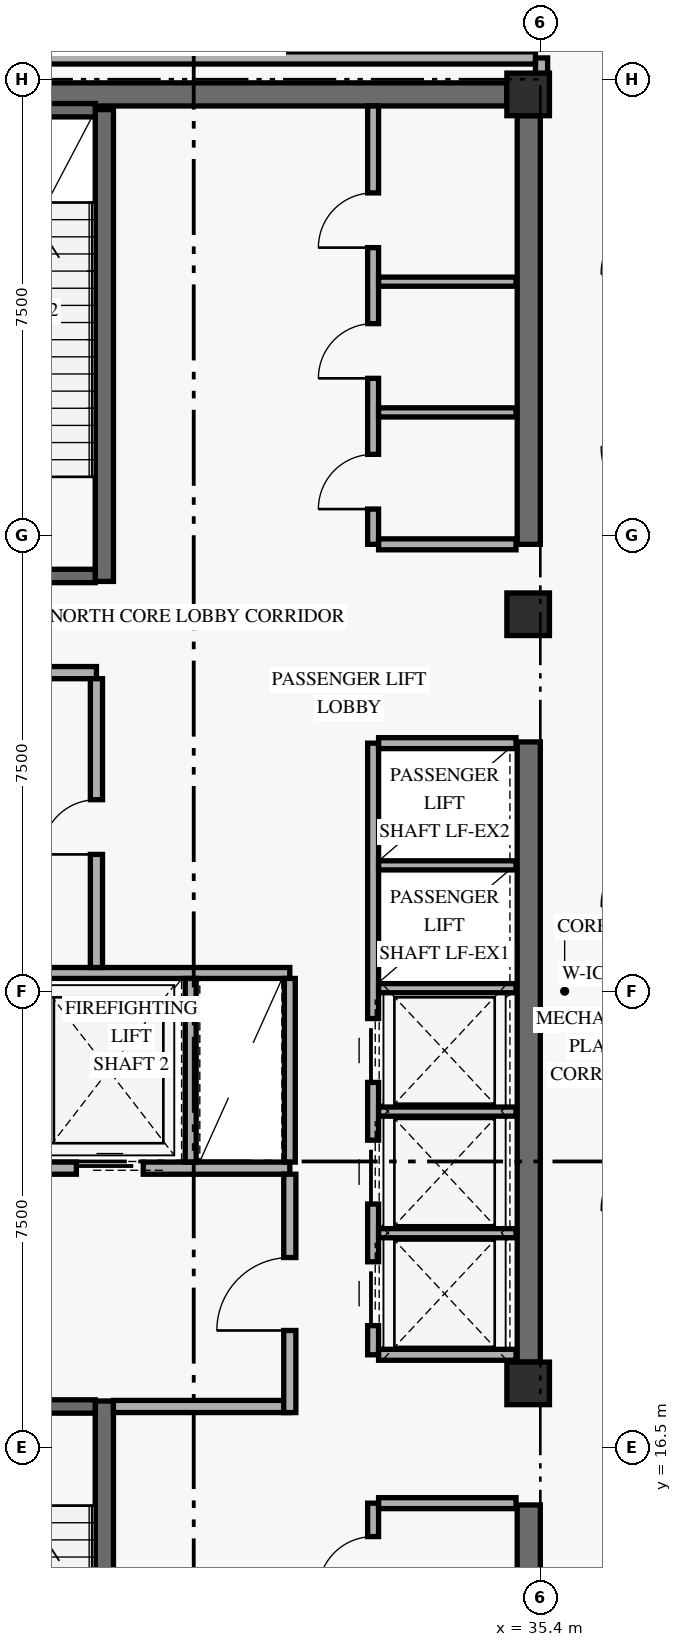
"""IFC4 building model, lengths in metres.
Left out: names, types, materials, properties, quantities, classifications, styles, units other than length and angle.
Written with IfcOpenShell. Run it as: python <this file> out.ifc"""

import sys

from ifc_helpers import new_model, si_unit, direction, frame, frame_2d, origin, origin_2d, place, context, subcontext, project, spatial, rectangle, extrude, element, fill, save


model = new_model("IFC4")
c1 = context("Model", 3, precision=1e-05, world=origin(), true_north=direction((0.0, 1.0)))
c2 = subcontext(c1, "Body", "Model", "MODEL_VIEW")
j1 = project(units=[si_unit("LENGTHUNIT", "METRE"), si_unit("PLANEANGLEUNIT", "RADIAN")], contexts=[c1])
p1 = place(None, origin())
s1 = spatial("IfcSite", under=j1, at=p1, CompositionType="ELEMENT")
p2 = place(p1, origin())
s2 = spatial("IfcBuilding", under=s1, at=p2, CompositionType="ELEMENT")
p3 = place(p2, frame((0.0, 0.0, 199.8)))
s3 = spatial("IfcBuildingStorey", under=s2, at=p3, CompositionType="ELEMENT", Elevation=199.8)
p4 = place(p3, frame((35.21, 9.6, 0.0), z_axis=(0.0, 0.0, 1.0), x_axis=(0.0, 1.0, 0.0)))
e1 = element("IfcWall", 1, at=p4, inside=s3, PredefinedType="SHEAR", context=c2, shape_type="SweptSolid", body=[
    extrude(rectangle(XDim=5.95, YDim=0.38, at=frame_2d((2.975, 0.0))), origin(), (0.0, 0.0, 1.0), 5.148),
])
p5 = place(p3, frame((35.21, 17.9, 0.0), z_axis=(0.0, 0.0, 1.0), x_axis=(0.0, 1.0, 0.0)))
e2 = element("IfcWall", 2, at=p5, inside=s3, PredefinedType="SHEAR", context=c2, shape_type="SweptSolid", body=[
    extrude(rectangle(XDim=10.2, YDim=0.38, at=frame_2d((5.1, 0.0))), origin(), (0.0, 0.0, 1.0), 5.148),
])
p6 = place(p3, frame((35.21, 31.35, 0.0), z_axis=(0.0, 0.0, 1.0), x_axis=(0.0, 1.0, 0.0)))
e3 = element("IfcWall", 3, at=p6, inside=s3, PredefinedType="SHEAR", context=c2, shape_type="SweptSolid", body=[
    extrude(rectangle(XDim=7.05, YDim=0.38, at=frame_2d((3.525, 0.0))), origin(), (0.0, 0.0, 1.0), 5.148),
])
p7 = place(p3, frame((24.55, 38.75, 0.0), z_axis=(0.0, 0.0, 1.0), x_axis=(1.0, 0.0, 0.0)))
e4 = element("IfcWall", 4, at=p7, inside=s3, PredefinedType="SHEAR", context=c2, shape_type="SweptSolid", body=[
    extrude(rectangle(XDim=10.3, YDim=0.38, at=frame_2d((5.15, 0.0))), origin(), (0.0, 0.0, 1.0), 5.76),
])
p8 = place(p3, frame((28.23, 9.5, 0.0), z_axis=(0.0, 0.0, 1.0), x_axis=(0.0, 1.0, 0.0)))
e5 = element("IfcWall", 5, at=p8, inside=s3, PredefinedType="SHEAR", context=c2, shape_type="SweptSolid", body=[
    extrude(rectangle(XDim=7.76, YDim=0.3, at=frame_2d((3.88, 0.0))), origin(), (0.0, 0.0, 1.0), 5.76),
])
p9 = place(p3, frame((24.92, 17.17, 0.0), z_axis=(0.0, 0.0, 1.0), x_axis=(1.0, 0.0, 0.0)))
e6 = element("IfcWall", 6, at=p9, inside=s3, PredefinedType="SHEAR", context=c2, shape_type="SweptSolid", body=[
    extrude(rectangle(XDim=3.16, YDim=0.22, at=frame_2d((1.58, 0.0))), origin(), (0.0, 0.0, 1.0), 5.76),
])
p10 = place(p9, frame((0.78, 0.0, 0.0)))
e7 = element("IfcOpeningElement", 7, at=p10, cuts=e6, PredefinedType="OPENING", context=c2, shape_type="SweptSolid", body=[
    extrude(rectangle(XDim=1.05, YDim=2.15, at=frame_2d((0.525, 1.075))), frame((0.0, 0.12, 0.0), z_axis=(0.0, -1.0, 0.0), x_axis=(1.0, 0.0, 0.0)), (0.0, 0.0, 1.0), 0.24),
])
p11 = place(p3, frame((28.23, 30.74, 0.0), z_axis=(0.0, 0.0, 1.0), x_axis=(0.0, 1.0, 0.0)))
e8 = element("IfcWall", 8, at=p11, inside=s3, PredefinedType="SHEAR", context=c2, shape_type="SweptSolid", body=[
    extrude(rectangle(XDim=7.76, YDim=0.3, at=frame_2d((3.88, 0.0))), origin(), (0.0, 0.0, 1.0), 5.76),
])
p12 = place(p3, frame((24.92, 30.83, 0.0), z_axis=(0.0, 0.0, 1.0), x_axis=(1.0, 0.0, 0.0)))
e9 = element("IfcWall", 9, at=p12, inside=s3, PredefinedType="SHEAR", context=c2, shape_type="SweptSolid", body=[
    extrude(rectangle(XDim=3.16, YDim=0.22, at=frame_2d((1.58, 0.0))), origin(), (0.0, 0.0, 1.0), 5.76),
])
p13 = place(p12, frame((0.78, 0.0, 0.0)))
e10 = element("IfcOpeningElement", 10, at=p13, cuts=e9, PredefinedType="OPENING", context=c2, shape_type="SweptSolid", body=[
    extrude(rectangle(XDim=1.05, YDim=2.15, at=frame_2d((0.525, 1.075))), frame((0.0, 0.12, 0.0), z_axis=(0.0, -1.0, 0.0), x_axis=(1.0, 0.0, 0.0)), (0.0, 0.0, 1.0), 0.24),
])
p14 = place(p3, frame((24.92, 38.49, 0.0), z_axis=(0.0, 0.0, 1.0), x_axis=(1.0, 0.0, 0.0)))
e11 = element("IfcWall", 11, at=p14, inside=s3, PredefinedType="SHEAR", context=c2, shape_type="SweptSolid", body=[
    extrude(rectangle(XDim=3.16, YDim=0.22, at=frame_2d((1.58, 0.0))), origin(), (0.0, 0.0, 1.0), 5.76),
])
for number, where, z_axis, x_axis in (
    (12, (35.2, 17.55, 0.0), (0.0, 0.0, 1.0), (1.0, 0.0, 0.0)),
    (13, (35.2, 30.2, 0.0), (0.0, 0.0, 1.0), (1.0, 0.0, 0.0)),
    (14, (35.2, 38.75, 0.0), (0.0, 0.0, 1.0), (1.0, 0.0, 0.0)),
):
    element("IfcColumn", number, at=place(p3, frame(where, z_axis=z_axis, x_axis=x_axis)), inside=s3, PredefinedType="COLUMN", context=c2, shape_type="SweptSolid", body=[
        extrude(rectangle(XDim=0.7, YDim=0.7, at=origin_2d()), origin(), (0.0, 0.0, 1.0), 6.0),
    ])
p15 = place(p3, frame((24.45, 21.09, 0.0), z_axis=(0.0, 0.0, 1.0), x_axis=(1.0, 0.0, 0.0)))
e15 = element("IfcWall", 15, at=p15, inside=s3, PredefinedType="STANDARD", context=c2, shape_type="SweptSolid", body=[
    extrude(rectangle(XDim=6.83, YDim=0.2, at=frame_2d((3.415, 0.0))), origin(), (0.0, 0.0, 1.0), 5.76),
])
p16 = place(p15, frame((0.72, 0.0, 0.0)))
e16 = element("IfcOpeningElement", 16, at=p16, cuts=e15, PredefinedType="OPENING", context=c2, shape_type="SweptSolid", body=[
    extrude(rectangle(XDim=1.1, YDim=2.2, at=frame_2d((0.55, 1.1))), frame((0.0, 0.11, 0.0), z_axis=(0.0, -1.0, 0.0), x_axis=(1.0, 0.0, 0.0)), (0.0, 0.0, 1.0), 0.22),
])
p17 = place(p15, frame((3.32, 0.0, 0.0)))
e17 = element("IfcOpeningElement", 17, at=p17, cuts=e15, PredefinedType="OPENING", context=c2, shape_type="SweptSolid", body=[
    extrude(rectangle(XDim=1.1, YDim=2.2, at=frame_2d((0.55, 1.1))), frame((0.0, 0.11, 0.0), z_axis=(0.0, -1.0, 0.0), x_axis=(1.0, 0.0, 0.0)), (0.0, 0.0, 1.0), 0.22),
])
p18 = place(p3, frame((28.38, 17.17, 0.0), z_axis=(0.0, 0.0, 1.0), x_axis=(1.0, 0.0, 0.0)))
e18 = element("IfcWall", 18, at=p18, inside=s3, PredefinedType="STANDARD", context=c2, shape_type="SweptSolid", body=[
    extrude(rectangle(XDim=2.9, YDim=0.2, at=frame_2d((1.45, 0.0))), origin(), (0.0, 0.0, 1.0), 5.76),
])
p19 = place(p3, frame((31.28, 17.07, 0.0), z_axis=(0.0, 0.0, 1.0), x_axis=(0.0, 1.0, 0.0)))
e19 = element("IfcWall", 19, at=p19, inside=s3, PredefinedType="STANDARD", context=c2, shape_type="SweptSolid", body=[
    extrude(rectangle(XDim=3.92, YDim=0.2, at=frame_2d((1.96, 0.0))), origin(), (0.0, 0.0, 1.0), 5.13),
])
p20 = place(p19, frame((1.35, 0.0, 0.0)))
e20 = element("IfcOpeningElement", 20, at=p20, cuts=e19, PredefinedType="OPENING", context=c2, shape_type="SweptSolid", body=[
    extrude(rectangle(XDim=1.2, YDim=2.15, at=frame_2d((0.6, 1.075))), frame((0.0, 0.11, 0.0), z_axis=(0.0, -1.0, 0.0), x_axis=(1.0, 0.0, 0.0)), (0.0, 0.0, 1.0), 0.22),
])
p21 = place(p3, frame((24.45, 24.3, 0.0), z_axis=(0.0, 0.0, 1.0), x_axis=(1.0, 0.0, 0.0)))
e21 = element("IfcWall", 21, at=p21, inside=s3, PredefinedType="STANDARD", context=c2, shape_type="SweptSolid", body=[
    extrude(rectangle(XDim=6.83, YDim=0.18, at=frame_2d((3.415, 0.0))), origin(), (0.0, 0.0, 1.0), 5.76),
])
for number, where, z_axis, x_axis in (
    (22, (29.65, 21.19, 0.0), (0.0, 0.0, 1.0), (0.0, 1.0, 0.0)),
    (23, (31.28, 21.19, 0.0), (0.0, 0.0, 1.0), (0.0, 1.0, 0.0)),
):
    element("IfcWall", number, at=place(p3, frame(where, z_axis=z_axis, x_axis=x_axis)), inside=s3, PredefinedType="STANDARD", context=c2, shape_type="SweptSolid", body=[
        extrude(rectangle(XDim=3.02, YDim=0.18, at=frame_2d((1.51, 0.0))), origin(), (0.0, 0.0, 1.0), 5.76),
    ])
p22 = place(p3, frame((24.45, 29.24, 0.0), z_axis=(0.0, 0.0, 1.0), x_axis=(1.0, 0.0, 0.0)))
e24 = element("IfcWall", 24, at=p22, inside=s3, PredefinedType="STANDARD", context=c2, shape_type="SweptSolid", body=[
    extrude(rectangle(XDim=3.65, YDim=0.2, at=frame_2d((1.825, 0.0))), origin(), (0.0, 0.0, 1.0), 5.76),
])
p23 = place(p3, frame((28.1, 24.39, 0.0), z_axis=(0.0, 0.0, 1.0), x_axis=(0.0, 1.0, 0.0)))
e25 = element("IfcWall", 25, at=p23, inside=s3, PredefinedType="STANDARD", context=c2, shape_type="SweptSolid", body=[
    extrude(rectangle(XDim=4.75, YDim=0.2, at=frame_2d((2.375, 0.0))), origin(), (0.0, 0.0, 1.0), 5.76),
])
p24 = place(p23, frame((1.86, 0.0, 0.0)))
e26 = element("IfcOpeningElement", 26, at=p24, cuts=e25, PredefinedType="OPENING", context=c2, shape_type="SweptSolid", body=[
    extrude(rectangle(XDim=0.9, YDim=2.1, at=frame_2d((0.45, 1.05))), frame((0.0, 0.11, 0.0), z_axis=(0.0, -1.0, 0.0), x_axis=(1.0, 0.0, 0.0)), (0.0, 0.0, 1.0), 0.22),
])
p25 = place(p3, frame((32.65, 9.5, 0.0), z_axis=(0.0, 0.0, 1.0), x_axis=(0.0, 1.0, 0.0)))
e27 = element("IfcWall", 27, at=p25, inside=s3, PredefinedType="STANDARD", context=c2, shape_type="SweptSolid", body=[
    extrude(rectangle(XDim=6.08, YDim=0.18, at=frame_2d((3.04, 0.0))), origin(), (0.0, 0.0, 1.0), 5.76),
])
p26 = place(p25, frame((0.63, 0.0, 0.0)))
e28 = element("IfcOpeningElement", 28, at=p26, cuts=e27, PredefinedType="OPENING", context=c2, shape_type="SweptSolid", body=[
    extrude(rectangle(XDim=0.9, YDim=2.1, at=frame_2d((0.45, 1.05))), frame((0.0, 0.1, 0.0), z_axis=(0.0, -1.0, 0.0), x_axis=(1.0, 0.0, 0.0)), (0.0, 0.0, 1.0), 0.2),
])
p27 = place(p25, frame((2.63, 0.0, 0.0)))
e29 = element("IfcOpeningElement", 29, at=p27, cuts=e27, PredefinedType="OPENING", context=c2, shape_type="SweptSolid", body=[
    extrude(rectangle(XDim=0.9, YDim=2.1, at=frame_2d((0.45, 1.05))), frame((0.0, 0.1, 0.0), z_axis=(0.0, -1.0, 0.0), x_axis=(1.0, 0.0, 0.0)), (0.0, 0.0, 1.0), 0.2),
])
p28 = place(p25, frame((4.63, 0.0, 0.0)))
e30 = element("IfcOpeningElement", 30, at=p28, cuts=e27, PredefinedType="OPENING", context=c2, shape_type="SweptSolid", body=[
    extrude(rectangle(XDim=0.9, YDim=2.1, at=frame_2d((0.45, 1.05))), frame((0.0, 0.1, 0.0), z_axis=(0.0, -1.0, 0.0), x_axis=(1.0, 0.0, 0.0)), (0.0, 0.0, 1.0), 0.2),
])
p29 = place(p3, frame((32.74, 15.58, 0.0), z_axis=(0.0, 0.0, 1.0), x_axis=(1.0, 0.0, 0.0)))
e31 = element("IfcWall", 31, at=p29, inside=s3, PredefinedType="STANDARD", context=c2, shape_type="SweptSolid", body=[
    extrude(rectangle(XDim=2.26, YDim=0.18, at=frame_2d((1.13, 0.0))), origin(), (0.0, 0.0, 1.0), 5.76),
])
p30 = place(p3, frame((32.65, 18.02, 0.0), z_axis=(0.0, 0.0, 1.0), x_axis=(0.0, 1.0, 0.0)))
e32 = element("IfcWall", 32, at=p30, inside=s3, PredefinedType="STANDARD", context=c2, shape_type="SweptSolid", body=[
    extrude(rectangle(XDim=10.06, YDim=0.18, at=frame_2d((5.03, 0.0))), origin(), (0.0, 0.0, 1.0), 5.76),
])
p31 = place(p30, frame((0.48, 0.0, 0.0)))
e33 = element("IfcOpeningElement", 33, at=p31, cuts=e32, PredefinedType="OPENING", context=c2, shape_type="SweptSolid", body=[
    extrude(rectangle(XDim=1.05, YDim=2.2, at=frame_2d((0.525, 1.1))), frame((0.0, 0.1, 0.0), z_axis=(0.0, -1.0, 0.0), x_axis=(1.0, 0.0, 0.0)), (0.0, 0.0, 1.0), 0.2),
])
p32 = place(p30, frame((2.48, 0.0, 0.0)))
e34 = element("IfcOpeningElement", 34, at=p32, cuts=e32, PredefinedType="OPENING", context=c2, shape_type="SweptSolid", body=[
    extrude(rectangle(XDim=1.05, YDim=2.2, at=frame_2d((0.525, 1.1))), frame((0.0, 0.1, 0.0), z_axis=(0.0, -1.0, 0.0), x_axis=(1.0, 0.0, 0.0)), (0.0, 0.0, 1.0), 0.2),
])
p33 = place(p30, frame((4.48, 0.0, 0.0)))
e35 = element("IfcOpeningElement", 35, at=p33, cuts=e32, PredefinedType="OPENING", context=c2, shape_type="SweptSolid", body=[
    extrude(rectangle(XDim=1.05, YDim=2.2, at=frame_2d((0.525, 1.1))), frame((0.0, 0.1, 0.0), z_axis=(0.0, -1.0, 0.0), x_axis=(1.0, 0.0, 0.0)), (0.0, 0.0, 1.0), 0.2),
])
for number, where, z_axis, x_axis in (
    (36, (32.74, 18.02, 0.0), (0.0, 0.0, 1.0), (1.0, 0.0, 0.0)),
    (37, (32.74, 28.08, 0.0), (0.0, 0.0, 1.0), (1.0, 0.0, 0.0)),
):
    element("IfcWall", number, at=place(p3, frame(where, z_axis=z_axis, x_axis=x_axis)), inside=s3, PredefinedType="STANDARD", context=c2, shape_type="SweptSolid", body=[
        extrude(rectangle(XDim=2.26, YDim=0.18, at=frame_2d((1.13, 0.0))), origin(), (0.0, 0.0, 1.0), 5.76),
    ])
for number, where, z_axis, x_axis in (
    (38, (32.74, 20.02, 0.0), (0.0, 0.0, 1.0), (1.0, 0.0, 0.0)),
    (39, (32.74, 22.02, 0.0), (0.0, 0.0, 1.0), (1.0, 0.0, 0.0)),
    (40, (32.74, 24.05, 0.0), (0.0, 0.0, 1.0), (1.0, 0.0, 0.0)),
    (41, (32.74, 26.07, 0.0), (0.0, 0.0, 1.0), (1.0, 0.0, 0.0)),
):
    element("IfcWall", number, at=place(p3, frame(where, z_axis=z_axis, x_axis=x_axis)), inside=s3, PredefinedType="STANDARD", context=c2, shape_type="SweptSolid", body=[
        extrude(rectangle(XDim=2.26, YDim=0.15, at=frame_2d((1.13, 0.0))), origin(), (0.0, 0.0, 1.0), 5.76),
    ])
p34 = place(p3, frame((32.65, 31.35, 0.0), z_axis=(0.0, 0.0, 1.0), x_axis=(0.0, 1.0, 0.0)))
e42 = element("IfcWall", 42, at=p34, inside=s3, PredefinedType="STANDARD", context=c2, shape_type="SweptSolid", body=[
    extrude(rectangle(XDim=7.21, YDim=0.18, at=frame_2d((3.605, 0.0))), origin(), (0.0, 0.0, 1.0), 5.76),
])
p35 = place(p34, frame((0.58, 0.0, 0.0)))
e43 = element("IfcOpeningElement", 43, at=p35, cuts=e42, PredefinedType="OPENING", context=c2, shape_type="SweptSolid", body=[
    extrude(rectangle(XDim=0.9, YDim=2.1, at=frame_2d((0.45, 1.05))), frame((0.0, 0.1, 0.0), z_axis=(0.0, -1.0, 0.0), x_axis=(1.0, 0.0, 0.0)), (0.0, 0.0, 1.0), 0.2),
])
p36 = place(p34, frame((2.73, 0.0, 0.0)))
e44 = element("IfcOpeningElement", 44, at=p36, cuts=e42, PredefinedType="OPENING", context=c2, shape_type="SweptSolid", body=[
    extrude(rectangle(XDim=0.9, YDim=2.1, at=frame_2d((0.45, 1.05))), frame((0.0, 0.1, 0.0), z_axis=(0.0, -1.0, 0.0), x_axis=(1.0, 0.0, 0.0)), (0.0, 0.0, 1.0), 0.2),
])
p37 = place(p34, frame((4.88, 0.0, 0.0)))
e45 = element("IfcOpeningElement", 45, at=p37, cuts=e42, PredefinedType="OPENING", context=c2, shape_type="SweptSolid", body=[
    extrude(rectangle(XDim=0.9, YDim=2.1, at=frame_2d((0.45, 1.05))), frame((0.0, 0.1, 0.0), z_axis=(0.0, -1.0, 0.0), x_axis=(1.0, 0.0, 0.0)), (0.0, 0.0, 1.0), 0.2),
])
p38 = place(p3, frame((32.74, 31.35, 0.0), z_axis=(0.0, 0.0, 1.0), x_axis=(1.0, 0.0, 0.0)))
e46 = element("IfcWall", 46, at=p38, inside=s3, PredefinedType="STANDARD", context=c2, shape_type="SweptSolid", body=[
    extrude(rectangle(XDim=2.26, YDim=0.18, at=frame_2d((1.13, 0.0))), origin(), (0.0, 0.0, 1.0), 5.76),
])
for number, where, z_axis, x_axis in (
    (47, (32.74, 33.52, 0.0), (0.0, 0.0, 1.0), (1.0, 0.0, 0.0)),
    (48, (32.74, 35.67, 0.0), (0.0, 0.0, 1.0), (1.0, 0.0, 0.0)),
):
    element("IfcWall", number, at=place(p3, frame(where, z_axis=z_axis, x_axis=x_axis)), inside=s3, PredefinedType="STANDARD", context=c2, shape_type="SweptSolid", body=[
        extrude(rectangle(XDim=2.26, YDim=0.15, at=frame_2d((1.13, 0.0))), origin(), (0.0, 0.0, 1.0), 5.76),
    ])
p39 = place(p3, frame((35.42, 38.75, 0.0), z_axis=(0.0, 0.0, 1.0), x_axis=(0.0, 1.0, 0.0)))
e49 = element("IfcWall", 49, at=p39, inside=s3, PredefinedType="STANDARD", context=c2, shape_type="SweptSolid", body=[
    extrude(rectangle(XDim=0.6, YDim=0.2, at=frame_2d((0.3, 0.0))), origin(), (0.0, 0.0, 1.0), 5.13),
])
p40 = place(p3, frame((23.85, 39.35, 0.0), z_axis=(0.0, 0.0, 1.0), x_axis=(1.0, 0.0, 0.0)))
e50 = element("IfcWall", 50, at=p40, inside=s3, PredefinedType="STANDARD", context=c2, shape_type="SweptSolid", body=[
    extrude(rectangle(XDim=11.47, YDim=0.2, at=frame_2d((5.735, 0.0))), origin(), (0.0, 0.0, 1.0), 5.13),
])
p41 = place(p17, origin())
e51 = element("IfcDoor", 51, at=p41, inside=s3, OperationType="SLIDING_TO_LEFT", PredefinedType="DOOR", context=c2, shape_type="SweptSolid", body=[
    extrude(rectangle(XDim=1.1, YDim=2.2, at=frame_2d((0.55, 1.1))), frame((0.0, 0.025, 0.0), z_axis=(0.0, -1.0, 0.0), x_axis=(1.0, 0.0, 0.0)), (0.0, 0.0, 1.0), 0.05),
])
fill(e17, e51)
p42 = place(p20, origin())
e52 = element("IfcDoor", 52, at=p42, inside=s3, OperationType="SINGLE_SWING_LEFT", PredefinedType="DOOR", context=c2, shape_type="SweptSolid", body=[
    extrude(rectangle(XDim=1.2, YDim=2.15, at=frame_2d((0.6, 1.075))), frame((0.0, 0.025, 0.0), z_axis=(0.0, -1.0, 0.0), x_axis=(1.0, 0.0, 0.0)), (0.0, 0.0, 1.0), 0.05),
])
fill(e20, e52)
p43 = place(p24, origin())
e53 = element("IfcDoor", 53, at=p43, inside=s3, OperationType="SINGLE_SWING_LEFT", PredefinedType="DOOR", context=c2, shape_type="SweptSolid", body=[
    extrude(rectangle(XDim=0.9, YDim=2.1, at=frame_2d((0.45, 1.05))), frame((0.0, 0.025, 0.0), z_axis=(0.0, -1.0, 0.0), x_axis=(1.0, 0.0, 0.0)), (0.0, 0.0, 1.0), 0.05),
])
fill(e26, e53)
p44 = place(p28, origin())
e54 = element("IfcDoor", 54, at=p44, inside=s3, OperationType="SINGLE_SWING_LEFT", PredefinedType="DOOR", context=c2, shape_type="SweptSolid", body=[
    extrude(rectangle(XDim=0.9, YDim=2.1, at=frame_2d((0.45, 1.05))), frame((0.0, 0.025, 0.0), z_axis=(0.0, -1.0, 0.0), x_axis=(1.0, 0.0, 0.0)), (0.0, 0.0, 1.0), 0.05),
])
fill(e30, e54)
p45 = place(p31, origin())
e55 = element("IfcDoor", 55, at=p45, inside=s3, OperationType="SLIDING_TO_LEFT", PredefinedType="DOOR", context=c2, shape_type="SweptSolid", body=[
    extrude(rectangle(XDim=1.05, YDim=2.2, at=frame_2d((0.525, 1.1))), frame((0.0, 0.025, 0.0), z_axis=(0.0, -1.0, 0.0), x_axis=(1.0, 0.0, 0.0)), (0.0, 0.0, 1.0), 0.05),
])
fill(e33, e55)
p46 = place(p32, origin())
e56 = element("IfcDoor", 56, at=p46, inside=s3, OperationType="SLIDING_TO_LEFT", PredefinedType="DOOR", context=c2, shape_type="SweptSolid", body=[
    extrude(rectangle(XDim=1.05, YDim=2.2, at=frame_2d((0.525, 1.1))), frame((0.0, 0.025, 0.0), z_axis=(0.0, -1.0, 0.0), x_axis=(1.0, 0.0, 0.0)), (0.0, 0.0, 1.0), 0.05),
])
fill(e34, e56)
p47 = place(p33, origin())
e57 = element("IfcDoor", 57, at=p47, inside=s3, OperationType="SLIDING_TO_LEFT", PredefinedType="DOOR", context=c2, shape_type="SweptSolid", body=[
    extrude(rectangle(XDim=1.05, YDim=2.2, at=frame_2d((0.525, 1.1))), frame((0.0, 0.025, 0.0), z_axis=(0.0, -1.0, 0.0), x_axis=(1.0, 0.0, 0.0)), (0.0, 0.0, 1.0), 0.05),
])
fill(e35, e57)
p48 = place(p35, origin())
e58 = element("IfcDoor", 58, at=p48, inside=s3, OperationType="SINGLE_SWING_LEFT", PredefinedType="DOOR", context=c2, shape_type="SweptSolid", body=[
    extrude(rectangle(XDim=0.9, YDim=2.1, at=frame_2d((0.45, 1.05))), frame((0.0, 0.025, 0.0), z_axis=(0.0, -1.0, 0.0), x_axis=(1.0, 0.0, 0.0)), (0.0, 0.0, 1.0), 0.05),
])
fill(e43, e58)
p49 = place(p36, origin())
e59 = element("IfcDoor", 59, at=p49, inside=s3, OperationType="SINGLE_SWING_LEFT", PredefinedType="DOOR", context=c2, shape_type="SweptSolid", body=[
    extrude(rectangle(XDim=0.9, YDim=2.1, at=frame_2d((0.45, 1.05))), frame((0.0, 0.025, 0.0), z_axis=(0.0, -1.0, 0.0), x_axis=(1.0, 0.0, 0.0)), (0.0, 0.0, 1.0), 0.05),
])
fill(e44, e59)
p50 = place(p37, origin())
e60 = element("IfcDoor", 60, at=p50, inside=s3, OperationType="SINGLE_SWING_LEFT", PredefinedType="DOOR", context=c2, shape_type="SweptSolid", body=[
    extrude(rectangle(XDim=0.9, YDim=2.1, at=frame_2d((0.45, 1.05))), frame((0.0, 0.025, 0.0), z_axis=(0.0, -1.0, 0.0), x_axis=(1.0, 0.0, 0.0)), (0.0, 0.0, 1.0), 0.05),
])
fill(e45, e60)
save(model, sys.argv[1])
